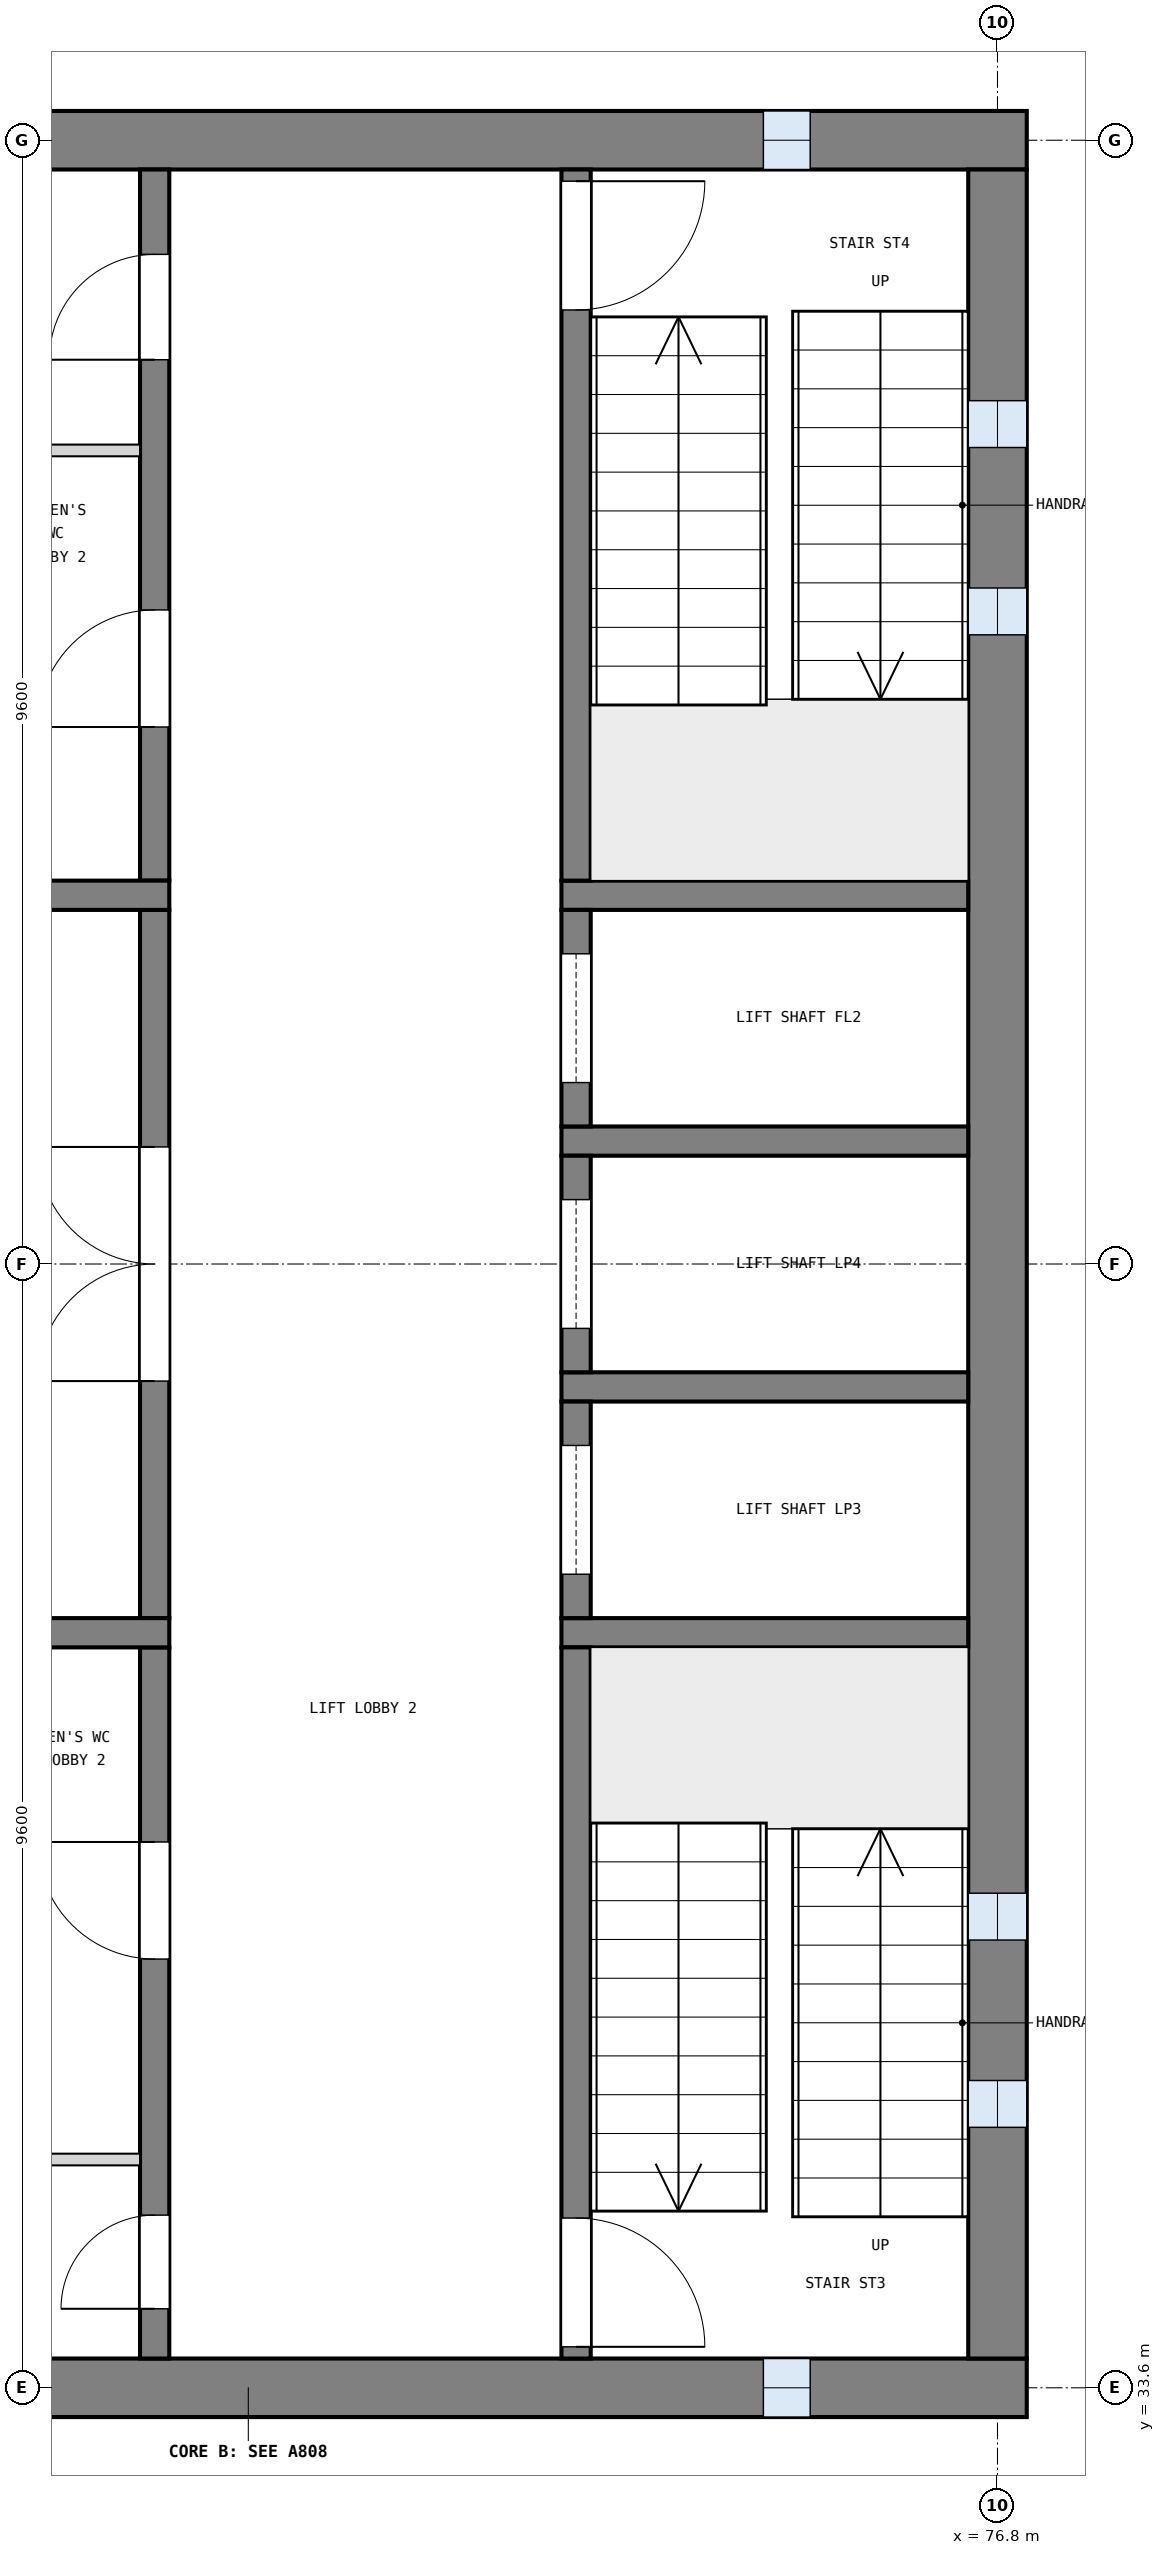
"""IFC4 building model, lengths in metres.
Left out: names, types, materials, properties, quantities, classifications, styles, units other than length and angle.
Written with IfcOpenShell. Run it as: python <this file> out.ifc"""

import sys

from ifc_helpers import new_model, si_unit, direction, frame, frame_2d, origin, place, context, subcontext, project, spatial, rectangle, extrude, element, fill, save


model = new_model("IFC4")
c1 = context("Model", 3, precision=1e-05, world=origin(), true_north=direction((0.0, 1.0)))
c2 = subcontext(c1, "Body", "Model", "MODEL_VIEW")
j1 = project(units=[si_unit("LENGTHUNIT", "METRE"), si_unit("PLANEANGLEUNIT", "RADIAN")], contexts=[c1])
p1 = place(None, origin())
s1 = spatial("IfcSite", under=j1, at=p1, CompositionType="ELEMENT")
p2 = place(p1, origin())
s2 = spatial("IfcBuilding", under=s1, at=p2, CompositionType="ELEMENT")
p3 = place(p2, frame((0.0, 0.0, 24.9)))
s3 = spatial("IfcBuildingStorey", under=s2, at=p3, CompositionType="ELEMENT", Elevation=24.9)
p4 = place(p3, frame((63.75, 52.8, 0.0), z_axis=(0.0, 0.0, 1.0), x_axis=(1.0, 0.0, 0.0)))
e1 = element("IfcWall", 1, at=p4, inside=s3, PredefinedType="SHEAR", context=c2, shape_type="SweptSolid", body=[
    extrude(rectangle(XDim=13.3, YDim=0.5, at=frame_2d((6.65, 0.0))), origin(), (0.0, 0.0, 1.0), 3.9),
])
p5 = place(p4, frame((11.05, 0.0, 1.0)))
e2 = element("IfcOpeningElement", 2, at=p5, cuts=e1, PredefinedType="OPENING", context=c2, shape_type="SweptSolid", body=[
    extrude(rectangle(XDim=0.4, YDim=2.0, at=frame_2d((0.2, 1.0))), frame((0.0, 0.26, 0.0), z_axis=(0.0, -1.0, 0.0), x_axis=(1.0, 0.0, 0.0)), (0.0, 0.0, 1.0), 0.52),
])
p6 = place(p3, frame((63.75, 33.6, 0.0), z_axis=(0.0, 0.0, 1.0), x_axis=(1.0, 0.0, 0.0)))
e3 = element("IfcWall", 3, at=p6, inside=s3, PredefinedType="SHEAR", context=c2, shape_type="SweptSolid", body=[
    extrude(rectangle(XDim=13.3, YDim=0.5, at=frame_2d((6.65, 0.0))), origin(), (0.0, 0.0, 1.0), 3.9),
])
p7 = place(p6, frame((11.05, 0.0, 1.0)))
e4 = element("IfcOpeningElement", 4, at=p7, cuts=e3, PredefinedType="OPENING", context=c2, shape_type="SweptSolid", body=[
    extrude(rectangle(XDim=0.4, YDim=2.0, at=frame_2d((0.2, 1.0))), frame((0.0, 0.26, 0.0), z_axis=(0.0, -1.0, 0.0), x_axis=(1.0, 0.0, 0.0)), (0.0, 0.0, 1.0), 0.52),
])
p8 = place(p3, frame((76.8, 33.85, 0.0), z_axis=(0.0, 0.0, 1.0), x_axis=(0.0, 1.0, 0.0)))
e5 = element("IfcWall", 5, at=p8, inside=s3, PredefinedType="SHEAR", context=c2, shape_type="SweptSolid", body=[
    extrude(rectangle(XDim=18.7, YDim=0.5, at=frame_2d((9.35, 0.0))), origin(), (0.0, 0.0, 1.0), 3.9),
])
p9 = place(p8, frame((1.975, 0.0, 1.0)))
e6 = element("IfcOpeningElement", 6, at=p9, cuts=e5, PredefinedType="OPENING", context=c2, shape_type="SweptSolid", body=[
    extrude(rectangle(XDim=0.4, YDim=2.0, at=frame_2d((0.2, 1.0))), frame((0.0, 0.26, 0.0), z_axis=(0.0, -1.0, 0.0), x_axis=(1.0, 0.0, 0.0)), (0.0, 0.0, 1.0), 0.52),
])
p10 = place(p8, frame((3.575, 0.0, 1.0)))
e7 = element("IfcOpeningElement", 7, at=p10, cuts=e5, PredefinedType="OPENING", context=c2, shape_type="SweptSolid", body=[
    extrude(rectangle(XDim=0.4, YDim=2.0, at=frame_2d((0.2, 1.0))), frame((0.0, 0.26, 0.0), z_axis=(0.0, -1.0, 0.0), x_axis=(1.0, 0.0, 0.0)), (0.0, 0.0, 1.0), 0.52),
])
p11 = place(p8, frame((14.725, 0.0, 1.0)))
e8 = element("IfcOpeningElement", 8, at=p11, cuts=e5, PredefinedType="OPENING", context=c2, shape_type="SweptSolid", body=[
    extrude(rectangle(XDim=0.4, YDim=2.0, at=frame_2d((0.2, 1.0))), frame((0.0, 0.26, 0.0), z_axis=(0.0, -1.0, 0.0), x_axis=(1.0, 0.0, 0.0)), (0.0, 0.0, 1.0), 0.52),
])
p12 = place(p8, frame((16.325, 0.0, 1.0)))
e9 = element("IfcOpeningElement", 9, at=p12, cuts=e5, PredefinedType="OPENING", context=c2, shape_type="SweptSolid", body=[
    extrude(rectangle(XDim=0.4, YDim=2.0, at=frame_2d((0.2, 1.0))), frame((0.0, 0.26, 0.0), z_axis=(0.0, -1.0, 0.0), x_axis=(1.0, 0.0, 0.0)), (0.0, 0.0, 1.0), 0.52),
])
for number, where, z_axis, x_axis in (
    (10, (76.55, 40.05, 0.0), (0.0, 0.0, 1.0), (-1.0, 0.0, 0.0)),
    (11, (76.55, 42.15, 0.0), (0.0, 0.0, 1.0), (-1.0, 0.0, 0.0)),
    (12, (76.55, 44.25, 0.0), (0.0, 0.0, 1.0), (-1.0, 0.0, 0.0)),
    (13, (76.55, 46.35, 0.0), (0.0, 0.0, 1.0), (-1.0, 0.0, 0.0)),
):
    element("IfcWall", number, at=place(p3, frame(where, z_axis=z_axis, x_axis=x_axis)), inside=s3, PredefinedType="SOLIDWALL", context=c2, shape_type="SweptSolid", body=[
        extrude(rectangle(XDim=3.475, YDim=0.25, at=frame_2d((1.738, 0.0))), origin(), (0.0, 0.0, 1.0), 3.6),
    ])
p13 = place(p3, frame((73.2, 33.85, 0.0), z_axis=(0.0, 0.0, 1.0), x_axis=(0.0, 1.0, 0.0)))
e14 = element("IfcWall", 14, at=p13, inside=s3, PredefinedType="SOLIDWALL", context=c2, shape_type="SweptSolid", body=[
    extrude(rectangle(XDim=6.075, YDim=0.25, at=frame_2d((3.038, 0.0))), origin(), (0.0, 0.0, 1.0), 3.6),
])
p14 = place(p13, frame((0.1, 0.0, 0.0)))
e15 = element("IfcOpeningElement", 15, at=p14, cuts=e14, PredefinedType="OPENING", context=c2, shape_type="SweptSolid", body=[
    extrude(rectangle(XDim=1.1, YDim=2.1, at=frame_2d((0.55, 1.05))), frame((0.0, 0.135, 0.0), z_axis=(0.0, -1.0, 0.0), x_axis=(1.0, 0.0, 0.0)), (0.0, 0.0, 1.0), 0.27),
])
p15 = place(p3, frame((73.2, 40.175, 0.0), z_axis=(0.0, 0.0, 1.0), x_axis=(0.0, 1.0, 0.0)))
e16 = element("IfcWall", 16, at=p15, inside=s3, PredefinedType="SOLIDWALL", context=c2, shape_type="SweptSolid", body=[
    extrude(rectangle(XDim=1.85, YDim=0.25, at=frame_2d((0.925, 0.0))), origin(), (0.0, 0.0, 1.0), 3.6),
])
p16 = place(p15, frame((0.375, 0.0, 0.0)))
e17 = element("IfcOpeningElement", 17, at=p16, cuts=e16, PredefinedType="OPENING", context=c2, shape_type="SweptSolid", body=[
    extrude(rectangle(XDim=1.1, YDim=2.1, at=frame_2d((0.55, 1.05))), frame((0.0, 0.135, 0.0), z_axis=(0.0, -1.0, 0.0), x_axis=(1.0, 0.0, 0.0)), (0.0, 0.0, 1.0), 0.27),
])
p17 = place(p3, frame((73.2, 42.275, 0.0), z_axis=(0.0, 0.0, 1.0), x_axis=(0.0, 1.0, 0.0)))
e18 = element("IfcWall", 18, at=p17, inside=s3, PredefinedType="SOLIDWALL", context=c2, shape_type="SweptSolid", body=[
    extrude(rectangle(XDim=1.85, YDim=0.25, at=frame_2d((0.925, 0.0))), origin(), (0.0, 0.0, 1.0), 3.6),
])
p18 = place(p17, frame((0.375, 0.0, 0.0)))
e19 = element("IfcOpeningElement", 19, at=p18, cuts=e18, PredefinedType="OPENING", context=c2, shape_type="SweptSolid", body=[
    extrude(rectangle(XDim=1.1, YDim=2.1, at=frame_2d((0.55, 1.05))), frame((0.0, 0.135, 0.0), z_axis=(0.0, -1.0, 0.0), x_axis=(1.0, 0.0, 0.0)), (0.0, 0.0, 1.0), 0.27),
])
p19 = place(p3, frame((73.2, 44.375, 0.0), z_axis=(0.0, 0.0, 1.0), x_axis=(0.0, 1.0, 0.0)))
e20 = element("IfcWall", 20, at=p19, inside=s3, PredefinedType="SOLIDWALL", context=c2, shape_type="SweptSolid", body=[
    extrude(rectangle(XDim=1.85, YDim=0.25, at=frame_2d((0.925, 0.0))), origin(), (0.0, 0.0, 1.0), 3.6),
])
p20 = place(p19, frame((0.375, 0.0, 0.0)))
e21 = element("IfcOpeningElement", 21, at=p20, cuts=e20, PredefinedType="OPENING", context=c2, shape_type="SweptSolid", body=[
    extrude(rectangle(XDim=1.1, YDim=2.1, at=frame_2d((0.55, 1.05))), frame((0.0, 0.135, 0.0), z_axis=(0.0, -1.0, 0.0), x_axis=(1.0, 0.0, 0.0)), (0.0, 0.0, 1.0), 0.27),
])
p21 = place(p3, frame((73.2, 46.475, 0.0), z_axis=(0.0, 0.0, 1.0), x_axis=(0.0, 1.0, 0.0)))
e22 = element("IfcWall", 22, at=p21, inside=s3, PredefinedType="SOLIDWALL", context=c2, shape_type="SweptSolid", body=[
    extrude(rectangle(XDim=6.075, YDim=0.25, at=frame_2d((3.038, 0.0))), origin(), (0.0, 0.0, 1.0), 3.6),
])
p22 = place(p21, frame((4.875, 0.0, 0.0)))
e23 = element("IfcOpeningElement", 23, at=p22, cuts=e22, PredefinedType="OPENING", context=c2, shape_type="SweptSolid", body=[
    extrude(rectangle(XDim=1.1, YDim=2.1, at=frame_2d((0.55, 1.05))), frame((0.0, 0.135, 0.0), z_axis=(0.0, -1.0, 0.0), x_axis=(1.0, 0.0, 0.0)), (0.0, 0.0, 1.0), 0.27),
])
p23 = place(p3, frame((69.6, 33.85, 0.0), z_axis=(0.0, 0.0, 1.0), x_axis=(0.0, 1.0, 0.0)))
e24 = element("IfcWall", 24, at=p23, inside=s3, PredefinedType="SOLIDWALL", context=c2, shape_type="SweptSolid", body=[
    extrude(rectangle(XDim=6.075, YDim=0.25, at=frame_2d((3.038, 0.0))), origin(), (0.0, 0.0, 1.0), 3.6),
])
p24 = place(p23, frame((0.425, 0.0, 0.0)))
e25 = element("IfcOpeningElement", 25, at=p24, cuts=e24, PredefinedType="OPENING", context=c2, shape_type="SweptSolid", body=[
    extrude(rectangle(XDim=0.8, YDim=2.1, at=frame_2d((0.4, 1.05))), frame((0.0, 0.135, 0.0), z_axis=(0.0, -1.0, 0.0), x_axis=(1.0, 0.0, 0.0)), (0.0, 0.0, 1.0), 0.27),
])
p25 = place(p23, frame((3.413, 0.0, 0.0)))
e26 = element("IfcOpeningElement", 26, at=p25, cuts=e24, PredefinedType="OPENING", context=c2, shape_type="SweptSolid", body=[
    extrude(rectangle(XDim=1.0, YDim=2.1, at=frame_2d((0.5, 1.05))), frame((0.0, 0.135, 0.0), z_axis=(0.0, -1.0, 0.0), x_axis=(1.0, 0.0, 0.0)), (0.0, 0.0, 1.0), 0.27),
])
p26 = place(p3, frame((69.6, 40.175, 0.0), z_axis=(0.0, 0.0, 1.0), x_axis=(0.0, 1.0, 0.0)))
e27 = element("IfcWall", 27, at=p26, inside=s3, PredefinedType="SOLIDWALL", context=c2, shape_type="SweptSolid", body=[
    extrude(rectangle(XDim=6.05, YDim=0.25, at=frame_2d((3.025, 0.0))), origin(), (0.0, 0.0, 1.0), 3.6),
])
p27 = place(p26, frame((2.025, 0.0, 0.0)))
e28 = element("IfcOpeningElement", 28, at=p27, cuts=e27, PredefinedType="OPENING", context=c2, shape_type="SweptSolid", body=[
    extrude(rectangle(XDim=2.0, YDim=2.1, at=frame_2d((1.0, 1.05))), frame((0.0, 0.135, 0.0), z_axis=(0.0, -1.0, 0.0), x_axis=(1.0, 0.0, 0.0)), (0.0, 0.0, 1.0), 0.27),
])
p28 = place(p3, frame((69.6, 46.475, 0.0), z_axis=(0.0, 0.0, 1.0), x_axis=(0.0, 1.0, 0.0)))
e29 = element("IfcWall", 29, at=p28, inside=s3, PredefinedType="SOLIDWALL", context=c2, shape_type="SweptSolid", body=[
    extrude(rectangle(XDim=6.075, YDim=0.25, at=frame_2d((3.038, 0.0))), origin(), (0.0, 0.0, 1.0), 3.6),
])
p29 = place(p28, frame((1.312, 0.0, 0.0)))
e30 = element("IfcOpeningElement", 30, at=p29, cuts=e29, PredefinedType="OPENING", context=c2, shape_type="SweptSolid", body=[
    extrude(rectangle(XDim=1.0, YDim=2.1, at=frame_2d((0.5, 1.05))), frame((0.0, 0.135, 0.0), z_axis=(0.0, -1.0, 0.0), x_axis=(1.0, 0.0, 0.0)), (0.0, 0.0, 1.0), 0.27),
])
p30 = place(p28, frame((4.45, 0.0, 0.0)))
e31 = element("IfcOpeningElement", 31, at=p30, cuts=e29, PredefinedType="OPENING", context=c2, shape_type="SweptSolid", body=[
    extrude(rectangle(XDim=0.9, YDim=2.1, at=frame_2d((0.45, 1.05))), frame((0.0, 0.135, 0.0), z_axis=(0.0, -1.0, 0.0), x_axis=(1.0, 0.0, 0.0)), (0.0, 0.0, 1.0), 0.27),
])
for number, where, z_axis, x_axis in (
    (32, (69.725, 40.05, 0.0), (0.0, 0.0, 1.0), (-1.0, 0.0, 0.0)),
    (33, (69.725, 46.35, 0.0), (0.0, 0.0, 1.0), (-1.0, 0.0, 0.0)),
):
    element("IfcWall", number, at=place(p3, frame(where, z_axis=z_axis, x_axis=x_axis)), inside=s3, PredefinedType="SOLIDWALL", context=c2, shape_type="SweptSolid", body=[
        extrude(rectangle(XDim=5.475, YDim=0.25, at=frame_2d((2.738, 0.0))), origin(), (0.0, 0.0, 1.0), 3.6),
    ])
for number, where, z_axis, x_axis in (
    (34, (69.475, 35.55, 0.0), (0.0, 0.0, 1.0), (-1.0, 0.0, 0.0)),
    (35, (69.475, 50.15, 0.0), (0.0, 0.0, 1.0), (-1.0, 0.0, 0.0)),
):
    element("IfcWall", number, at=place(p3, frame(where, z_axis=z_axis, x_axis=x_axis)), inside=s3, PredefinedType="PARTITIONING", context=c2, shape_type="SweptSolid", body=[
        extrude(rectangle(XDim=5.225, YDim=0.1, at=frame_2d((2.613, 0.0))), origin(), (0.0, 0.0, 1.0), 3.6),
    ])
p31 = place(p9, origin())
e36 = element("IfcWindow", 36, at=p31, inside=s3, PartitioningType="SINGLE_PANEL", PredefinedType="WINDOW", context=c2, shape_type="SweptSolid", body=[
    extrude(rectangle(XDim=0.4, YDim=2.0, at=frame_2d((0.2, 1.0))), frame((0.0, 0.03, 0.0), z_axis=(0.0, -1.0, 0.0), x_axis=(1.0, 0.0, 0.0)), (0.0, 0.0, 1.0), 0.06),
])
fill(e6, e36)
p32 = place(p10, origin())
e37 = element("IfcWindow", 37, at=p32, inside=s3, PartitioningType="SINGLE_PANEL", PredefinedType="WINDOW", context=c2, shape_type="SweptSolid", body=[
    extrude(rectangle(XDim=0.4, YDim=2.0, at=frame_2d((0.2, 1.0))), frame((0.0, 0.03, 0.0), z_axis=(0.0, -1.0, 0.0), x_axis=(1.0, 0.0, 0.0)), (0.0, 0.0, 1.0), 0.06),
])
fill(e7, e37)
p33 = place(p11, origin())
e38 = element("IfcWindow", 38, at=p33, inside=s3, PartitioningType="SINGLE_PANEL", PredefinedType="WINDOW", context=c2, shape_type="SweptSolid", body=[
    extrude(rectangle(XDim=0.4, YDim=2.0, at=frame_2d((0.2, 1.0))), frame((0.0, 0.03, 0.0), z_axis=(0.0, -1.0, 0.0), x_axis=(1.0, 0.0, 0.0)), (0.0, 0.0, 1.0), 0.06),
])
fill(e8, e38)
p34 = place(p12, origin())
e39 = element("IfcWindow", 39, at=p34, inside=s3, PartitioningType="SINGLE_PANEL", PredefinedType="WINDOW", context=c2, shape_type="SweptSolid", body=[
    extrude(rectangle(XDim=0.4, YDim=2.0, at=frame_2d((0.2, 1.0))), frame((0.0, 0.03, 0.0), z_axis=(0.0, -1.0, 0.0), x_axis=(1.0, 0.0, 0.0)), (0.0, 0.0, 1.0), 0.06),
])
fill(e9, e39)
p35 = place(p7, origin())
e40 = element("IfcWindow", 40, at=p35, inside=s3, PartitioningType="SINGLE_PANEL", PredefinedType="WINDOW", context=c2, shape_type="SweptSolid", body=[
    extrude(rectangle(XDim=0.4, YDim=2.0, at=frame_2d((0.2, 1.0))), frame((0.0, 0.03, 0.0), z_axis=(0.0, -1.0, 0.0), x_axis=(1.0, 0.0, 0.0)), (0.0, 0.0, 1.0), 0.06),
])
fill(e4, e40)
p36 = place(p5, origin())
e41 = element("IfcWindow", 41, at=p36, inside=s3, PartitioningType="SINGLE_PANEL", PredefinedType="WINDOW", context=c2, shape_type="SweptSolid", body=[
    extrude(rectangle(XDim=0.4, YDim=2.0, at=frame_2d((0.2, 1.0))), frame((0.0, 0.03, 0.0), z_axis=(0.0, -1.0, 0.0), x_axis=(1.0, 0.0, 0.0)), (0.0, 0.0, 1.0), 0.06),
])
fill(e2, e41)
p37 = place(p14, frame((1.1, 0.0, 0.0), z_axis=(0.0, 0.0, 1.0), x_axis=(-1.0, 0.0, 0.0)))
e42 = element("IfcDoor", 42, at=p37, inside=s3, OperationType="SINGLE_SWING_RIGHT", PredefinedType="DOOR", context=c2, shape_type="SweptSolid", body=[
    extrude(rectangle(XDim=1.1, YDim=2.1, at=frame_2d((0.55, 1.05))), frame((0.0, 0.025, 0.0), z_axis=(0.0, -1.0, 0.0), x_axis=(1.0, 0.0, 0.0)), (0.0, 0.0, 1.0), 0.05),
])
fill(e15, e42)
p38 = place(p22, frame((1.1, 0.0, 0.0), z_axis=(0.0, 0.0, 1.0), x_axis=(-1.0, 0.0, 0.0)))
e43 = element("IfcDoor", 43, at=p38, inside=s3, OperationType="SINGLE_SWING_LEFT", PredefinedType="DOOR", context=c2, shape_type="SweptSolid", body=[
    extrude(rectangle(XDim=1.1, YDim=2.1, at=frame_2d((0.55, 1.05))), frame((0.0, 0.025, 0.0), z_axis=(0.0, -1.0, 0.0), x_axis=(1.0, 0.0, 0.0)), (0.0, 0.0, 1.0), 0.05),
])
fill(e23, e43)
p39 = place(p16, origin())
e44 = element("IfcDoor", 44, at=p39, inside=s3, OperationType="SLIDING_TO_LEFT", PredefinedType="DOOR", context=c2, shape_type="SweptSolid", body=[
    extrude(rectangle(XDim=1.1, YDim=2.1, at=frame_2d((0.55, 1.05))), frame((0.0, 0.025, 0.0), z_axis=(0.0, -1.0, 0.0), x_axis=(1.0, 0.0, 0.0)), (0.0, 0.0, 1.0), 0.05),
])
fill(e17, e44)
p40 = place(p18, origin())
e45 = element("IfcDoor", 45, at=p40, inside=s3, OperationType="SLIDING_TO_LEFT", PredefinedType="DOOR", context=c2, shape_type="SweptSolid", body=[
    extrude(rectangle(XDim=1.1, YDim=2.1, at=frame_2d((0.55, 1.05))), frame((0.0, 0.025, 0.0), z_axis=(0.0, -1.0, 0.0), x_axis=(1.0, 0.0, 0.0)), (0.0, 0.0, 1.0), 0.05),
])
fill(e19, e45)
p41 = place(p20, origin())
e46 = element("IfcDoor", 46, at=p41, inside=s3, OperationType="SLIDING_TO_LEFT", PredefinedType="DOOR", context=c2, shape_type="SweptSolid", body=[
    extrude(rectangle(XDim=1.1, YDim=2.1, at=frame_2d((0.55, 1.05))), frame((0.0, 0.025, 0.0), z_axis=(0.0, -1.0, 0.0), x_axis=(1.0, 0.0, 0.0)), (0.0, 0.0, 1.0), 0.05),
])
fill(e21, e46)
p42 = place(p27, origin())
e47 = element("IfcDoor", 47, at=p42, inside=s3, OperationType="DOUBLE_DOOR_SINGLE_SWING", PredefinedType="DOOR", context=c2, shape_type="SweptSolid", body=[
    extrude(rectangle(XDim=2.0, YDim=2.1, at=frame_2d((1.0, 1.05))), frame((0.0, 0.025, 0.0), z_axis=(0.0, -1.0, 0.0), x_axis=(1.0, 0.0, 0.0)), (0.0, 0.0, 1.0), 0.05),
])
fill(e28, e47)
p43 = place(p24, origin())
e48 = element("IfcDoor", 48, at=p43, inside=s3, OperationType="SINGLE_SWING_LEFT", PredefinedType="DOOR", context=c2, shape_type="SweptSolid", body=[
    extrude(rectangle(XDim=0.8, YDim=2.1, at=frame_2d((0.4, 1.05))), frame((0.0, 0.025, 0.0), z_axis=(0.0, -1.0, 0.0), x_axis=(1.0, 0.0, 0.0)), (0.0, 0.0, 1.0), 0.05),
])
fill(e25, e48)
p44 = place(p25, origin())
e49 = element("IfcDoor", 49, at=p44, inside=s3, OperationType="SINGLE_SWING_RIGHT", PredefinedType="DOOR", context=c2, shape_type="SweptSolid", body=[
    extrude(rectangle(XDim=1.0, YDim=2.1, at=frame_2d((0.5, 1.05))), frame((0.0, 0.025, 0.0), z_axis=(0.0, -1.0, 0.0), x_axis=(1.0, 0.0, 0.0)), (0.0, 0.0, 1.0), 0.05),
])
fill(e26, e49)
p45 = place(p29, origin())
e50 = element("IfcDoor", 50, at=p45, inside=s3, OperationType="SINGLE_SWING_LEFT", PredefinedType="DOOR", context=c2, shape_type="SweptSolid", body=[
    extrude(rectangle(XDim=1.0, YDim=2.1, at=frame_2d((0.5, 1.05))), frame((0.0, 0.025, 0.0), z_axis=(0.0, -1.0, 0.0), x_axis=(1.0, 0.0, 0.0)), (0.0, 0.0, 1.0), 0.05),
])
fill(e30, e50)
p46 = place(p30, origin())
e51 = element("IfcDoor", 51, at=p46, inside=s3, OperationType="SINGLE_SWING_LEFT", PredefinedType="DOOR", context=c2, shape_type="SweptSolid", body=[
    extrude(rectangle(XDim=0.9, YDim=2.1, at=frame_2d((0.45, 1.05))), frame((0.0, 0.025, 0.0), z_axis=(0.0, -1.0, 0.0), x_axis=(1.0, 0.0, 0.0)), (0.0, 0.0, 1.0), 0.05),
])
fill(e31, e51)
save(model, sys.argv[1])
